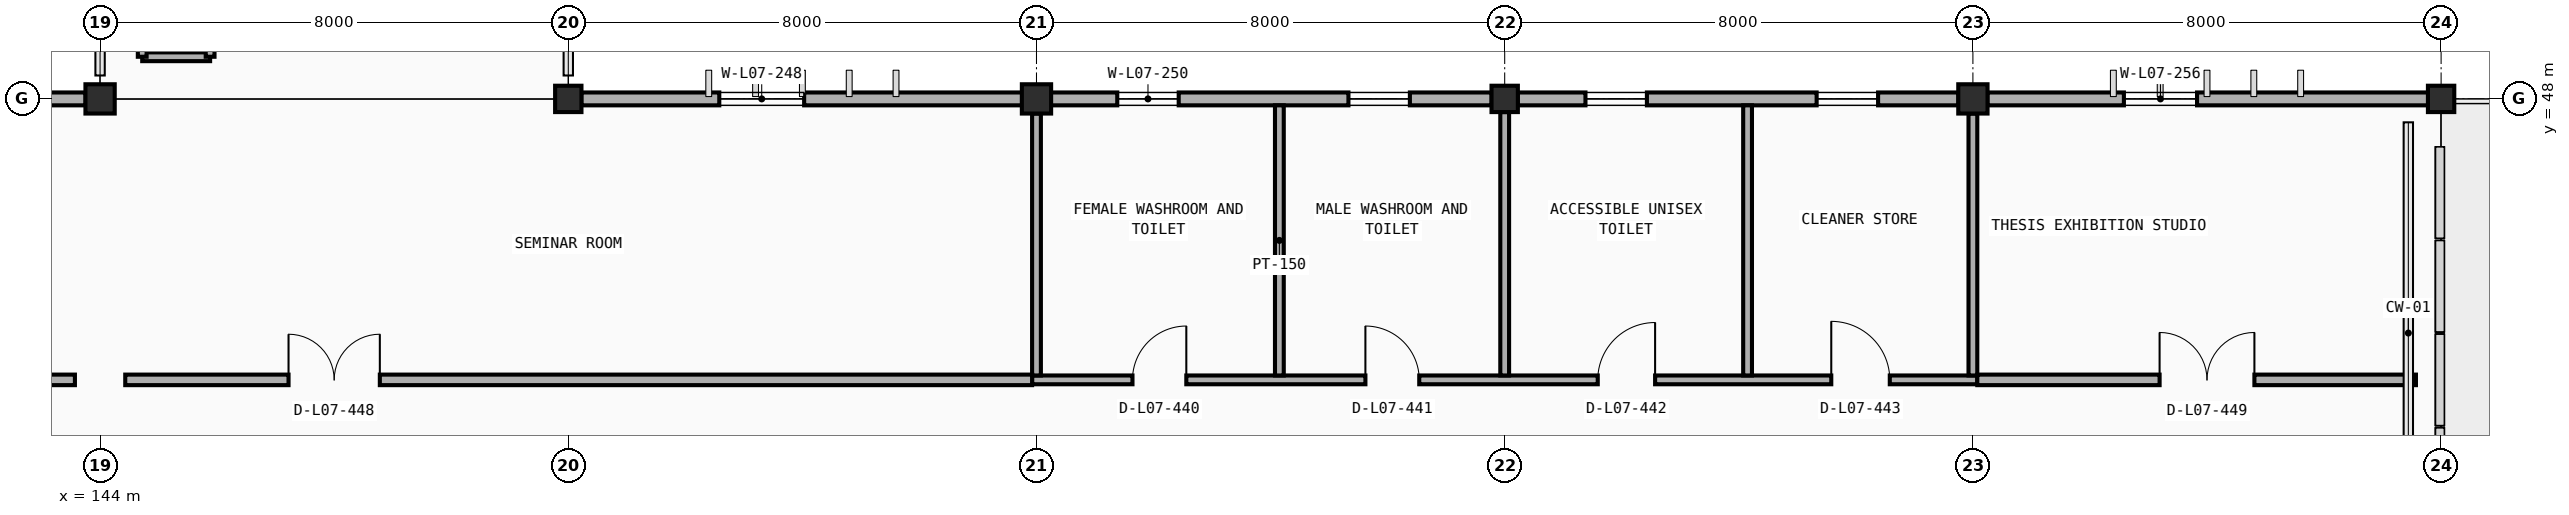
"""IFC4 building model, lengths in metres.
Left out: names, types, materials, properties, quantities, classifications, styles, units other than length and angle.
Written with IfcOpenShell. Run it as: python <this file> out.ifc"""

import sys

from ifc_helpers import new_model, si_unit, direction, frame, frame_2d, origin, origin_2d, place, context, subcontext, project, spatial, rectangle, extrude, element, fill, save


model = new_model("IFC4")
c1 = context("Model", 3, precision=1e-05, world=origin(), true_north=direction((0.0, 1.0)))
c2 = subcontext(c1, "Body", "Model", "MODEL_VIEW")
j1 = project(units=[si_unit("LENGTHUNIT", "METRE"), si_unit("PLANEANGLEUNIT", "RADIAN")], contexts=[c1])
p1 = place(None, origin())
s1 = spatial("IfcSite", under=j1, at=p1, CompositionType="ELEMENT")
p2 = place(p1, origin())
s2 = spatial("IfcBuilding", under=s1, at=p2, CompositionType="ELEMENT")
p3 = place(p2, frame((0.0, 0.0, 26.4)))
s3 = spatial("IfcBuildingStorey", under=s2, at=p3, CompositionType="ELEMENT", Elevation=26.4)
p4 = place(p3, frame((144.0, 48.0, 0.0), z_axis=(0.0, 0.0, 1.0), x_axis=(1.0, 0.0, 0.0)))
e1 = element("IfcColumn", 1, at=p4, inside=s3, PredefinedType="COLUMN", context=c2, shape_type="SweptSolid", body=[
    extrude(rectangle(XDim=0.5, YDim=0.5, at=origin_2d()), origin(), (0.0, 0.0, 1.0), 4.2),
])
p5 = place(p3, frame((152.0, 48.0, 0.0), z_axis=(0.0, 0.0, 1.0), x_axis=(1.0, 0.0, 0.0)))
e2 = element("IfcColumn", 2, at=p5, inside=s3, PredefinedType="COLUMN", context=c2, shape_type="SweptSolid", body=[
    extrude(rectangle(XDim=0.45, YDim=0.45, at=origin_2d()), origin(), (0.0, 0.0, 1.0), 4.2),
])
p6 = place(p3, frame((160.0, 48.0, 0.0), z_axis=(0.0, 0.0, 1.0), x_axis=(1.0, 0.0, 0.0)))
e3 = element("IfcColumn", 3, at=p6, inside=s3, PredefinedType="COLUMN", context=c2, shape_type="SweptSolid", body=[
    extrude(rectangle(XDim=0.5, YDim=0.5, at=origin_2d()), origin(), (0.0, 0.0, 1.0), 4.2),
])
p7 = place(p3, frame((168.0, 48.0, 0.0), z_axis=(0.0, 0.0, 1.0), x_axis=(1.0, 0.0, 0.0)))
e4 = element("IfcColumn", 4, at=p7, inside=s3, PredefinedType="COLUMN", context=c2, shape_type="SweptSolid", body=[
    extrude(rectangle(XDim=0.45, YDim=0.45, at=origin_2d()), origin(), (0.0, 0.0, 1.0), 4.2),
])
p8 = place(p3, frame((176.0, 48.0, 0.0), z_axis=(0.0, 0.0, 1.0), x_axis=(1.0, 0.0, 0.0)))
e5 = element("IfcColumn", 5, at=p8, inside=s3, PredefinedType="COLUMN", context=c2, shape_type="SweptSolid", body=[
    extrude(rectangle(XDim=0.5, YDim=0.5, at=origin_2d()), origin(), (0.0, 0.0, 1.0), 4.2),
])
p9 = place(p3, frame((184.0, 48.0, 0.0), z_axis=(0.0, 0.0, 1.0), x_axis=(1.0, 0.0, 0.0)))
e6 = element("IfcColumn", 6, at=p9, inside=s3, PredefinedType="COLUMN", context=c2, shape_type="SweptSolid", body=[
    extrude(rectangle(XDim=0.45, YDim=0.45, at=origin_2d()), origin(), (0.0, 0.0, 1.0), 4.2),
])
p10 = place(p3, frame((136.222, 48.0, 0.0), z_axis=(0.0, 0.0, 1.0), x_axis=(1.0, 0.0, 0.0)))
e7 = element("IfcWall", 7, at=p10, inside=s3, PredefinedType="STANDARD", context=c2, shape_type="SweptSolid", body=[
    extrude(rectangle(XDim=7.531, YDim=0.22, at=frame_2d((3.766, 0.0))), origin(), (0.0, 0.0, 1.0), 3.335),
])
p11 = place(p10, frame((2.358, 0.0, 0.9)))
e8 = element("IfcOpeningElement", 8, at=p11, cuts=e7, PredefinedType="OPENING", context=c2, shape_type="SweptSolid", body=[
    extrude(rectangle(XDim=1.05, YDim=2.0, at=frame_2d((0.525, 1.0))), frame((0.0, 0.12, 0.0), z_axis=(0.0, -1.0, 0.0), x_axis=(1.0, 0.0, 0.0)), (0.0, 0.0, 1.0), 0.24),
])
p12 = place(p3, frame((152.222, 48.0, 0.0), z_axis=(0.0, 0.0, 1.0), x_axis=(1.0, 0.0, 0.0)))
e9 = element("IfcWall", 9, at=p12, inside=s3, PredefinedType="STANDARD", context=c2, shape_type="SweptSolid", body=[
    extrude(rectangle(XDim=7.531, YDim=0.22, at=frame_2d((3.766, 0.0))), origin(), (0.0, 0.0, 1.0), 3.335),
])
p13 = place(p12, frame((2.358, 0.0, 0.9)))
e10 = element("IfcOpeningElement", 10, at=p13, cuts=e9, PredefinedType="OPENING", context=c2, shape_type="SweptSolid", body=[
    extrude(rectangle(XDim=1.45, YDim=2.0, at=frame_2d((0.725, 1.0))), frame((0.0, 0.12, 0.0), z_axis=(0.0, -1.0, 0.0), x_axis=(1.0, 0.0, 0.0)), (0.0, 0.0, 1.0), 0.24),
])
p14 = place(p3, frame((160.247, 48.0, 0.0), z_axis=(0.0, 0.0, 1.0), x_axis=(1.0, 0.0, 0.0)))
e11 = element("IfcWall", 11, at=p14, inside=s3, PredefinedType="STANDARD", context=c2, shape_type="SweptSolid", body=[
    extrude(rectangle(XDim=7.531, YDim=0.22, at=frame_2d((3.766, 0.0))), origin(), (0.0, 0.0, 1.0), 3.335),
])
p15 = place(p14, frame((1.133, 0.0, 1.15)))
e12 = element("IfcOpeningElement", 12, at=p15, cuts=e11, PredefinedType="OPENING", context=c2, shape_type="SweptSolid", body=[
    extrude(rectangle(XDim=1.05, YDim=1.25, at=frame_2d((0.525, 0.625))), frame((0.0, 0.12, 0.0), z_axis=(0.0, -1.0, 0.0), x_axis=(1.0, 0.0, 0.0)), (0.0, 0.0, 1.0), 0.24),
])
p16 = place(p14, frame((5.083, 0.0, 1.15)))
e13 = element("IfcOpeningElement", 13, at=p16, cuts=e11, PredefinedType="OPENING", context=c2, shape_type="SweptSolid", body=[
    extrude(rectangle(XDim=1.05, YDim=1.25, at=frame_2d((0.525, 0.625))), frame((0.0, 0.12, 0.0), z_axis=(0.0, -1.0, 0.0), x_axis=(1.0, 0.0, 0.0)), (0.0, 0.0, 1.0), 0.24),
])
p17 = place(p3, frame((168.222, 48.0, 0.0), z_axis=(0.0, 0.0, 1.0), x_axis=(1.0, 0.0, 0.0)))
e14 = element("IfcWall", 14, at=p17, inside=s3, PredefinedType="STANDARD", context=c2, shape_type="SweptSolid", body=[
    extrude(rectangle(XDim=7.531, YDim=0.22, at=frame_2d((3.766, 0.0))), origin(), (0.0, 0.0, 1.0), 3.335),
])
p18 = place(p17, frame((1.158, 0.0, 1.15)))
e15 = element("IfcOpeningElement", 15, at=p18, cuts=e14, PredefinedType="OPENING", context=c2, shape_type="SweptSolid", body=[
    extrude(rectangle(XDim=1.05, YDim=1.25, at=frame_2d((0.525, 0.625))), frame((0.0, 0.12, 0.0), z_axis=(0.0, -1.0, 0.0), x_axis=(1.0, 0.0, 0.0)), (0.0, 0.0, 1.0), 0.24),
])
p19 = place(p17, frame((5.108, 0.0, 1.15)))
e16 = element("IfcOpeningElement", 16, at=p19, cuts=e14, PredefinedType="OPENING", context=c2, shape_type="SweptSolid", body=[
    extrude(rectangle(XDim=1.05, YDim=1.25, at=frame_2d((0.525, 0.625))), frame((0.0, 0.12, 0.0), z_axis=(0.0, -1.0, 0.0), x_axis=(1.0, 0.0, 0.0)), (0.0, 0.0, 1.0), 0.24),
])
p20 = place(p3, frame((176.247, 48.0, 0.0), z_axis=(0.0, 0.0, 1.0), x_axis=(1.0, 0.0, 0.0)))
e17 = element("IfcWall", 17, at=p20, inside=s3, PredefinedType="STANDARD", context=c2, shape_type="SweptSolid", body=[
    extrude(rectangle(XDim=7.531, YDim=0.22, at=frame_2d((3.766, 0.0))), origin(), (0.0, 0.0, 1.0), 3.335),
])
p21 = place(p20, frame((2.333, 0.0, 0.9)))
e18 = element("IfcOpeningElement", 18, at=p21, cuts=e17, PredefinedType="OPENING", context=c2, shape_type="SweptSolid", body=[
    extrude(rectangle(XDim=1.25, YDim=2.0, at=frame_2d((0.625, 1.0))), frame((0.0, 0.12, 0.0), z_axis=(0.0, -1.0, 0.0), x_axis=(1.0, 0.0, 0.0)), (0.0, 0.0, 1.0), 0.24),
])
p22 = place(p3, frame((183.76, 47.78, 0.0), z_axis=(0.0, 0.0, 1.0), x_axis=(-1.0, 0.0, 0.0)))
e19 = element("IfcWall", 19, at=p22, inside=s3, PredefinedType="PARAPET", context=c2, shape_type="SweptSolid", body=[
    extrude(rectangle(XDim=0.32, YDim=0.2, at=frame_2d((0.16, 0.0))), origin(), (0.0, 0.0, 1.0), 3.35),
])
for number, where, z_axis, x_axis in (
    (20, (144.72, 48.72, 0.0), (0.0, 0.0, 1.0), (1.0, 0.0, 0.0)),
    (21, (145.88, 48.72, 0.0), (0.0, 0.0, 1.0), (0.0, 1.0, 0.0)),
    (22, (144.72, 49.88, 0.0), (0.0, 0.0, 1.0), (0.0, -1.0, 0.0)),
):
    element("IfcWall", number, at=place(p3, frame(where, z_axis=z_axis, x_axis=x_axis)), inside=s3, PredefinedType="PARTITIONING", context=c2, shape_type="SweptSolid", body=[
        extrude(rectangle(XDim=1.16, YDim=0.15, at=frame_2d((0.58, 0.0))), origin(), (0.0, 0.0, 1.0), 3.9),
    ])
p23 = place(p3, frame((159.925, 43.2, 0.0), z_axis=(0.0, 0.0, 1.0), x_axis=(1.0, 0.0, 0.0)))
e23 = element("IfcWall", 23, at=p23, inside=s3, PredefinedType="PARTITIONING", context=c2, shape_type="SweptSolid", body=[
    extrude(rectangle(XDim=16.15, YDim=0.15, at=frame_2d((8.075, 0.0))), origin(), (0.0, 0.0, 1.0), 3.3),
])
p24 = place(p23, frame((1.715, 0.0, 0.0)))
e24 = element("IfcOpeningElement", 24, at=p24, cuts=e23, PredefinedType="OPENING", context=c2, shape_type="SweptSolid", body=[
    extrude(rectangle(XDim=0.92, YDim=2.12, at=frame_2d((0.46, 1.06))), frame((0.0, 0.085, 0.0), z_axis=(0.0, -1.0, 0.0), x_axis=(1.0, 0.0, 0.0)), (0.0, 0.0, 1.0), 0.17),
])
p25 = place(p23, frame((5.695, 0.0, 0.0)))
e25 = element("IfcOpeningElement", 25, at=p25, cuts=e23, PredefinedType="OPENING", context=c2, shape_type="SweptSolid", body=[
    extrude(rectangle(XDim=0.92, YDim=2.12, at=frame_2d((0.46, 1.06))), frame((0.0, 0.085, 0.0), z_axis=(0.0, -1.0, 0.0), x_axis=(1.0, 0.0, 0.0)), (0.0, 0.0, 1.0), 0.17),
])
p26 = place(p23, frame((9.665, 0.0, 0.0)))
e26 = element("IfcOpeningElement", 26, at=p26, cuts=e23, PredefinedType="OPENING", context=c2, shape_type="SweptSolid", body=[
    extrude(rectangle(XDim=0.98, YDim=2.12, at=frame_2d((0.49, 1.06))), frame((0.0, 0.085, 0.0), z_axis=(0.0, -1.0, 0.0), x_axis=(1.0, 0.0, 0.0)), (0.0, 0.0, 1.0), 0.17),
])
p27 = place(p23, frame((13.655, 0.0, 0.0)))
e27 = element("IfcOpeningElement", 27, at=p27, cuts=e23, PredefinedType="OPENING", context=c2, shape_type="SweptSolid", body=[
    extrude(rectangle(XDim=1.0, YDim=2.15, at=frame_2d((0.5, 1.075))), frame((0.0, 0.085, 0.0), z_axis=(0.0, -1.0, 0.0), x_axis=(1.0, 0.0, 0.0)), (0.0, 0.0, 1.0), 0.17),
])
p28 = place(p3, frame((160.0, 43.275, 0.0), z_axis=(0.0, 0.0, 1.0), x_axis=(0.0, 1.0, 0.0)))
e28 = element("IfcWall", 28, at=p28, inside=s3, PredefinedType="PARTITIONING", context=c2, shape_type="SweptSolid", body=[
    extrude(rectangle(XDim=4.475, YDim=0.15, at=frame_2d((2.238, 0.0))), origin(), (0.0, 0.0, 1.0), 3.3),
])
p29 = place(p3, frame((164.15, 43.275, 0.0), z_axis=(0.0, 0.0, 1.0), x_axis=(0.0, 1.0, 0.0)))
e29 = element("IfcWall", 29, at=p29, inside=s3, PredefinedType="PARTITIONING", context=c2, shape_type="SweptSolid", body=[
    extrude(rectangle(XDim=4.615, YDim=0.15, at=frame_2d((2.308, 0.0))), origin(), (0.0, 0.0, 1.0), 3.3),
])
p30 = place(p3, frame((168.0, 43.275, 0.0), z_axis=(0.0, 0.0, 1.0), x_axis=(0.0, 1.0, 0.0)))
e30 = element("IfcWall", 30, at=p30, inside=s3, PredefinedType="PARTITIONING", context=c2, shape_type="SweptSolid", body=[
    extrude(rectangle(XDim=4.5, YDim=0.15, at=frame_2d((2.25, 0.0))), origin(), (0.0, 0.0, 1.0), 3.3),
])
p31 = place(p3, frame((172.15, 43.275, 0.0), z_axis=(0.0, 0.0, 1.0), x_axis=(0.0, 1.0, 0.0)))
e31 = element("IfcWall", 31, at=p31, inside=s3, PredefinedType="PARTITIONING", context=c2, shape_type="SweptSolid", body=[
    extrude(rectangle(XDim=4.615, YDim=0.15, at=frame_2d((2.308, 0.0))), origin(), (0.0, 0.0, 1.0), 3.3),
])
p32 = place(p3, frame((176.0, 43.275, 0.0), z_axis=(0.0, 0.0, 1.0), x_axis=(0.0, 1.0, 0.0)))
e32 = element("IfcWall", 32, at=p32, inside=s3, PredefinedType="PARTITIONING", context=c2, shape_type="SweptSolid", body=[
    extrude(rectangle(XDim=4.475, YDim=0.15, at=frame_2d((2.238, 0.0))), origin(), (0.0, 0.0, 1.0), 3.3),
])
p33 = place(p3, frame((128.43, 43.2, 0.0), z_axis=(0.0, 0.0, 1.0), x_axis=(1.0, 0.0, 0.0)))
e33 = element("IfcWall", 33, at=p33, inside=s3, PredefinedType="PARTITIONING", context=c2, shape_type="SweptSolid", body=[
    extrude(rectangle(XDim=15.14, YDim=0.18, at=frame_2d((7.57, 0.0))), origin(), (0.0, 0.0, 1.0), 3.3),
])
p34 = place(p33, frame((2.83, 0.0, 0.0)))
e34 = element("IfcOpeningElement", 34, at=p34, cuts=e33, PredefinedType="OPENING", context=c2, shape_type="SweptSolid", body=[
    extrude(rectangle(XDim=1.48, YDim=2.2, at=frame_2d((0.74, 1.1))), frame((0.0, 0.1, 0.0), z_axis=(0.0, -1.0, 0.0), x_axis=(1.0, 0.0, 0.0)), (0.0, 0.0, 1.0), 0.2),
])
p35 = place(p3, frame((144.43, 43.2, 0.0), z_axis=(0.0, 0.0, 1.0), x_axis=(1.0, 0.0, 0.0)))
e35 = element("IfcWall", 35, at=p35, inside=s3, PredefinedType="PARTITIONING", context=c2, shape_type="SweptSolid", body=[
    extrude(rectangle(XDim=15.495, YDim=0.18, at=frame_2d((7.748, 0.0))), origin(), (0.0, 0.0, 1.0), 3.3),
])
p36 = place(p35, frame((2.79, 0.0, 0.0)))
e36 = element("IfcOpeningElement", 36, at=p36, cuts=e35, PredefinedType="OPENING", context=c2, shape_type="SweptSolid", body=[
    extrude(rectangle(XDim=1.56, YDim=2.2, at=frame_2d((0.78, 1.1))), frame((0.0, 0.1, 0.0), z_axis=(0.0, -1.0, 0.0), x_axis=(1.0, 0.0, 0.0)), (0.0, 0.0, 1.0), 0.2),
])
p37 = place(p3, frame((176.075, 43.2, 0.0), z_axis=(0.0, 0.0, 1.0), x_axis=(1.0, 0.0, 0.0)))
e37 = element("IfcWall", 37, at=p37, inside=s3, PredefinedType="PARTITIONING", context=c2, shape_type="SweptSolid", body=[
    extrude(rectangle(XDim=7.495, YDim=0.18, at=frame_2d((3.748, 0.0))), origin(), (0.0, 0.0, 1.0), 3.3),
])
p38 = place(p37, frame((3.115, 0.0, 0.0)))
e38 = element("IfcOpeningElement", 38, at=p38, cuts=e37, PredefinedType="OPENING", context=c2, shape_type="SweptSolid", body=[
    extrude(rectangle(XDim=1.62, YDim=2.2, at=frame_2d((0.81, 1.1))), frame((0.0, 0.1, 0.0), z_axis=(0.0, -1.0, 0.0), x_axis=(1.0, 0.0, 0.0)), (0.0, 0.0, 1.0), 0.2),
])
p39 = place(p13, origin())
e39 = element("IfcWindow", 39, at=p39, inside=s3, PartitioningType="SINGLE_PANEL", PredefinedType="WINDOW", context=c2, shape_type="SweptSolid", body=[
    extrude(rectangle(XDim=1.45, YDim=2.0, at=frame_2d((0.725, 1.0))), frame((0.0, 0.03, 0.0), z_axis=(0.0, -1.0, 0.0), x_axis=(1.0, 0.0, 0.0)), (0.0, 0.0, 1.0), 0.06),
])
fill(e10, e39)
p40 = place(p15, origin())
e40 = element("IfcWindow", 40, at=p40, inside=s3, PartitioningType="SINGLE_PANEL", PredefinedType="WINDOW", context=c2, shape_type="SweptSolid", body=[
    extrude(rectangle(XDim=1.05, YDim=1.25, at=frame_2d((0.525, 0.625))), frame((0.0, 0.03, 0.0), z_axis=(0.0, -1.0, 0.0), x_axis=(1.0, 0.0, 0.0)), (0.0, 0.0, 1.0), 0.06),
])
fill(e12, e40)
p41 = place(p16, origin())
e41 = element("IfcWindow", 41, at=p41, inside=s3, PartitioningType="SINGLE_PANEL", PredefinedType="WINDOW", context=c2, shape_type="SweptSolid", body=[
    extrude(rectangle(XDim=1.05, YDim=1.25, at=frame_2d((0.525, 0.625))), frame((0.0, 0.03, 0.0), z_axis=(0.0, -1.0, 0.0), x_axis=(1.0, 0.0, 0.0)), (0.0, 0.0, 1.0), 0.06),
])
fill(e13, e41)
p42 = place(p18, origin())
e42 = element("IfcWindow", 42, at=p42, inside=s3, PartitioningType="SINGLE_PANEL", PredefinedType="WINDOW", context=c2, shape_type="SweptSolid", body=[
    extrude(rectangle(XDim=1.05, YDim=1.25, at=frame_2d((0.525, 0.625))), frame((0.0, 0.03, 0.0), z_axis=(0.0, -1.0, 0.0), x_axis=(1.0, 0.0, 0.0)), (0.0, 0.0, 1.0), 0.06),
])
fill(e15, e42)
p43 = place(p19, origin())
e43 = element("IfcWindow", 43, at=p43, inside=s3, PartitioningType="SINGLE_PANEL", PredefinedType="WINDOW", context=c2, shape_type="SweptSolid", body=[
    extrude(rectangle(XDim=1.05, YDim=1.25, at=frame_2d((0.525, 0.625))), frame((0.0, 0.03, 0.0), z_axis=(0.0, -1.0, 0.0), x_axis=(1.0, 0.0, 0.0)), (0.0, 0.0, 1.0), 0.06),
])
fill(e16, e43)
p44 = place(p21, origin())
e44 = element("IfcWindow", 44, at=p44, inside=s3, PartitioningType="SINGLE_PANEL", PredefinedType="WINDOW", context=c2, shape_type="SweptSolid", body=[
    extrude(rectangle(XDim=1.25, YDim=2.0, at=frame_2d((0.625, 1.0))), frame((0.0, 0.03, 0.0), z_axis=(0.0, -1.0, 0.0), x_axis=(1.0, 0.0, 0.0)), (0.0, 0.0, 1.0), 0.06),
])
fill(e18, e44)
p45 = place(p24, origin())
e45 = element("IfcDoor", 45, at=p45, inside=s3, OperationType="SINGLE_SWING_RIGHT", PredefinedType="DOOR", context=c2, shape_type="SweptSolid", body=[
    extrude(rectangle(XDim=0.92, YDim=2.12, at=frame_2d((0.46, 1.06))), frame((0.0, 0.025, 0.0), z_axis=(0.0, -1.0, 0.0), x_axis=(1.0, 0.0, 0.0)), (0.0, 0.0, 1.0), 0.05),
])
fill(e24, e45)
p46 = place(p25, origin())
e46 = element("IfcDoor", 46, at=p46, inside=s3, OperationType="SINGLE_SWING_LEFT", PredefinedType="DOOR", context=c2, shape_type="SweptSolid", body=[
    extrude(rectangle(XDim=0.92, YDim=2.12, at=frame_2d((0.46, 1.06))), frame((0.0, 0.025, 0.0), z_axis=(0.0, -1.0, 0.0), x_axis=(1.0, 0.0, 0.0)), (0.0, 0.0, 1.0), 0.05),
])
fill(e25, e46)
p47 = place(p26, origin())
e47 = element("IfcDoor", 47, at=p47, inside=s3, OperationType="SINGLE_SWING_RIGHT", PredefinedType="DOOR", context=c2, shape_type="SweptSolid", body=[
    extrude(rectangle(XDim=0.98, YDim=2.12, at=frame_2d((0.49, 1.06))), frame((0.0, 0.025, 0.0), z_axis=(0.0, -1.0, 0.0), x_axis=(1.0, 0.0, 0.0)), (0.0, 0.0, 1.0), 0.05),
])
fill(e26, e47)
p48 = place(p27, origin())
e48 = element("IfcDoor", 48, at=p48, inside=s3, OperationType="SINGLE_SWING_LEFT", PredefinedType="DOOR", context=c2, shape_type="SweptSolid", body=[
    extrude(rectangle(XDim=1.0, YDim=2.15, at=frame_2d((0.5, 1.075))), frame((0.0, 0.025, 0.0), z_axis=(0.0, -1.0, 0.0), x_axis=(1.0, 0.0, 0.0)), (0.0, 0.0, 1.0), 0.05),
])
fill(e27, e48)
p49 = place(p36, origin())
e49 = element("IfcDoor", 49, at=p49, inside=s3, OperationType="DOUBLE_DOOR_SINGLE_SWING", PredefinedType="DOOR", context=c2, shape_type="SweptSolid", body=[
    extrude(rectangle(XDim=1.56, YDim=2.2, at=frame_2d((0.78, 1.1))), frame((0.0, 0.025, 0.0), z_axis=(0.0, -1.0, 0.0), x_axis=(1.0, 0.0, 0.0)), (0.0, 0.0, 1.0), 0.05),
])
fill(e36, e49)
p50 = place(p38, origin())
e50 = element("IfcDoor", 50, at=p50, inside=s3, OperationType="DOUBLE_DOOR_SINGLE_SWING", PredefinedType="DOOR", context=c2, shape_type="SweptSolid", body=[
    extrude(rectangle(XDim=1.62, YDim=2.2, at=frame_2d((0.81, 1.1))), frame((0.0, 0.025, 0.0), z_axis=(0.0, -1.0, 0.0), x_axis=(1.0, 0.0, 0.0)), (0.0, 0.0, 1.0), 0.05),
])
fill(e38, e50)
save(model, sys.argv[1])
